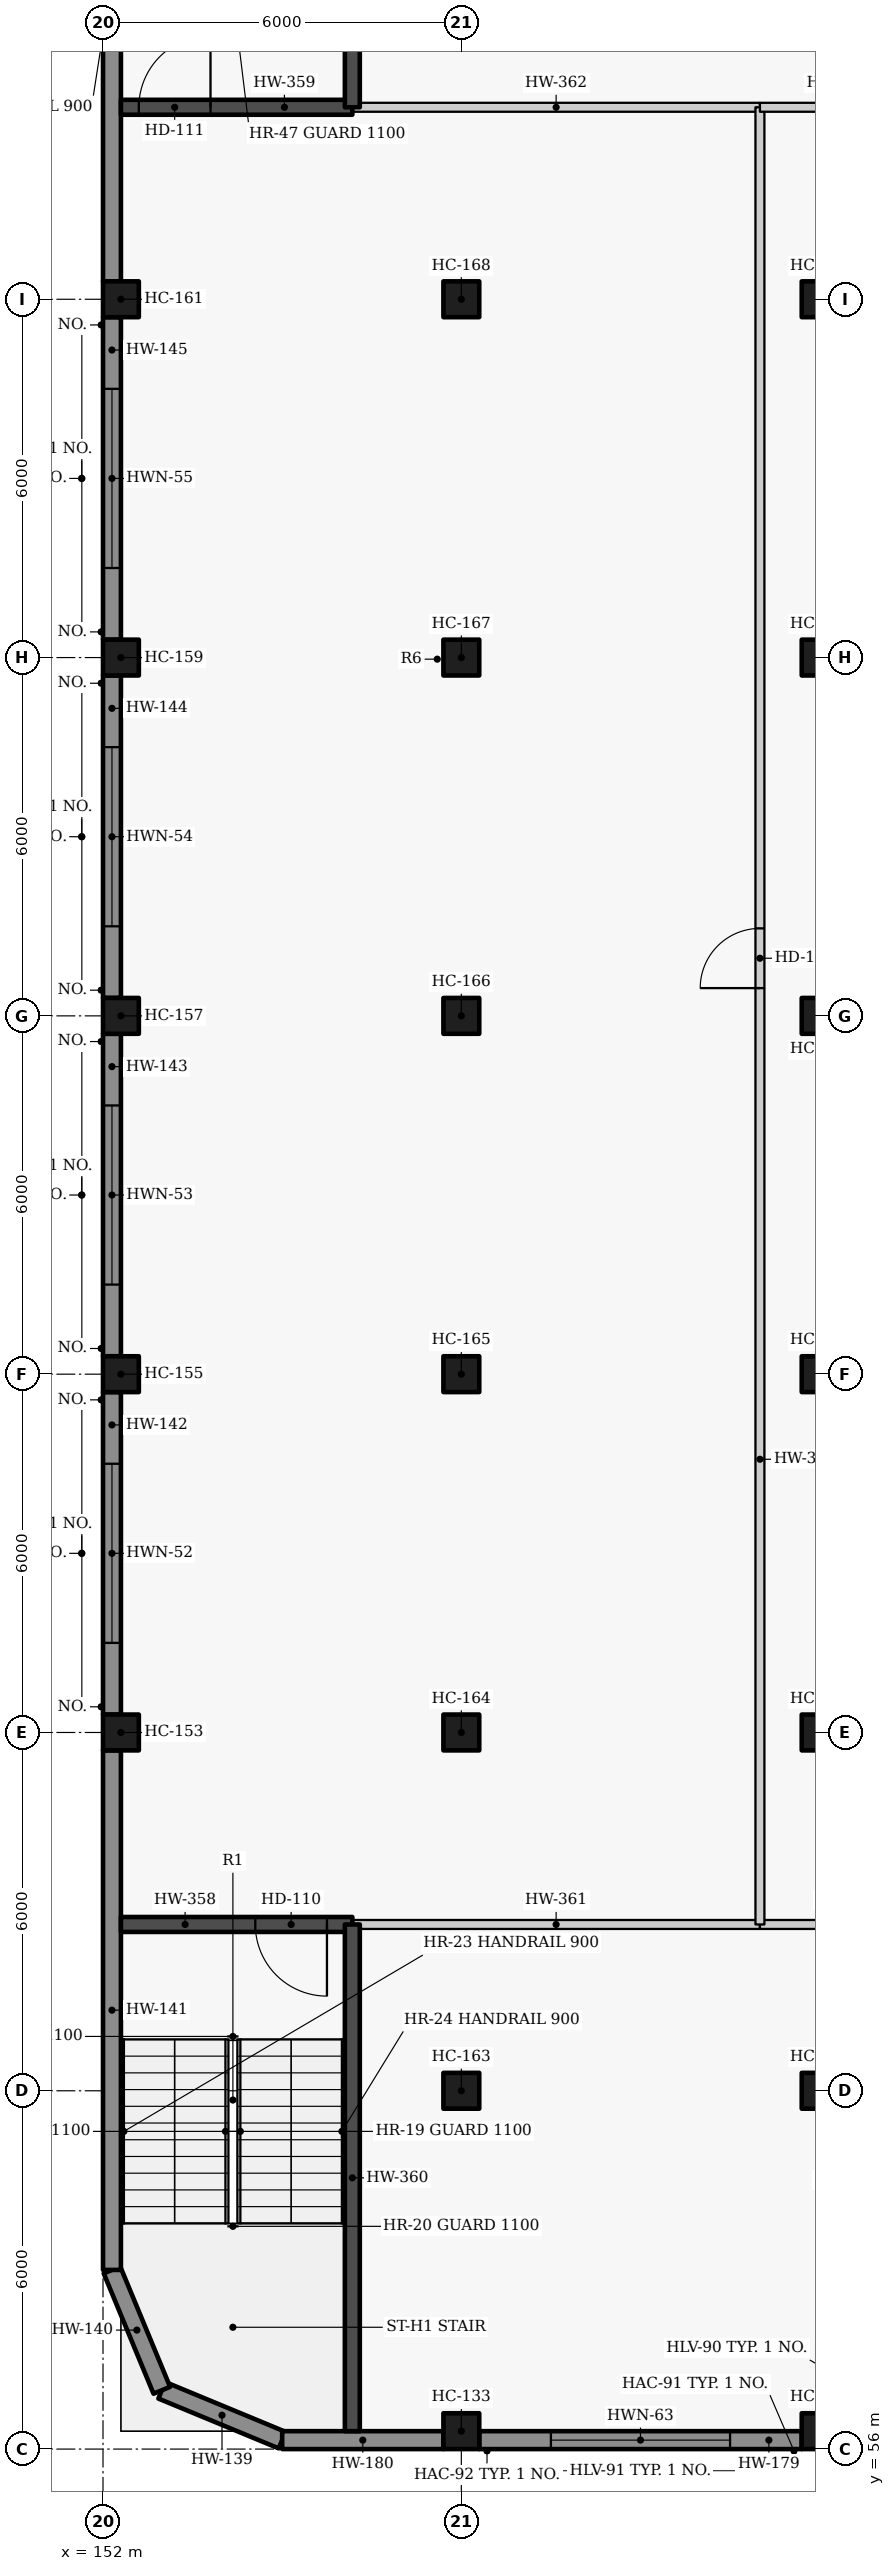
"""IFC4 building model, lengths in metres.
Left out: names, types, materials, properties, quantities, classifications, styles, units other than length and angle.
Written with IfcOpenShell. Run it as: python <this file> out.ifc"""

import sys

from ifc_helpers import new_model, si_unit, direction, frame, frame_2d, origin, origin_2d, place, context, subcontext, project, spatial, rectangle, extrude, element, fill, save


model = new_model("IFC4")
c1 = context("Model", 3, precision=1e-05, world=origin(), true_north=direction((0.0, 1.0)))
c2 = subcontext(c1, "Body", "Model", "MODEL_VIEW")
j1 = project(units=[si_unit("LENGTHUNIT", "METRE"), si_unit("PLANEANGLEUNIT", "RADIAN")], contexts=[c1])
p1 = place(None, origin())
s1 = spatial("IfcSite", under=j1, at=p1, CompositionType="ELEMENT")
p2 = place(p1, origin())
s2 = spatial("IfcBuilding", under=s1, at=p2, CompositionType="ELEMENT")
p3 = place(p2, frame((0.0, 0.0, 15.6)))
s3 = spatial("IfcBuildingStorey", under=s2, at=p3, CompositionType="ELEMENT", Elevation=15.6)
for number, where, z_axis, x_axis in (
    (1, (158.0, 56.3, 0.0), (0.0, 0.0, 1.0), (1.0, 0.0, 0.0)),
    (2, (164.0, 56.3, 0.0), (0.0, 0.0, 1.0), (1.0, 0.0, 0.0)),
    (3, (152.3, 68.0, 0.0), (0.0, 0.0, 1.0), (1.0, 0.0, 0.0)),
    (4, (152.3, 74.0, 0.0), (0.0, 0.0, 1.0), (1.0, 0.0, 0.0)),
    (5, (152.3, 80.0, 0.0), (0.0, 0.0, 1.0), (1.0, 0.0, 0.0)),
    (6, (152.3, 86.0, 0.0), (0.0, 0.0, 1.0), (1.0, 0.0, 0.0)),
    (7, (152.3, 92.0, 0.0), (0.0, 0.0, 1.0), (1.0, 0.0, 0.0)),
    (8, (158.0, 62.0, 0.0), (0.0, 0.0, 1.0), (1.0, 0.0, 0.0)),
    (9, (158.0, 68.0, 0.0), (0.0, 0.0, 1.0), (1.0, 0.0, 0.0)),
    (10, (158.0, 74.0, 0.0), (0.0, 0.0, 1.0), (1.0, 0.0, 0.0)),
    (11, (158.0, 80.0, 0.0), (0.0, 0.0, 1.0), (1.0, 0.0, 0.0)),
    (12, (158.0, 86.0, 0.0), (0.0, 0.0, 1.0), (1.0, 0.0, 0.0)),
    (13, (158.0, 92.0, 0.0), (0.0, 0.0, 1.0), (1.0, 0.0, 0.0)),
    (14, (164.0, 62.0, 0.0), (0.0, 0.0, 1.0), (1.0, 0.0, 0.0)),
    (15, (164.0, 68.0, 0.0), (0.0, 0.0, 1.0), (1.0, 0.0, 0.0)),
    (16, (164.0, 74.0, 0.0), (0.0, 0.0, 1.0), (1.0, 0.0, 0.0)),
    (17, (164.0, 80.0, 0.0), (0.0, 0.0, 1.0), (1.0, 0.0, 0.0)),
    (18, (164.0, 86.0, 0.0), (0.0, 0.0, 1.0), (1.0, 0.0, 0.0)),
    (19, (164.0, 92.0, 0.0), (0.0, 0.0, 1.0), (1.0, 0.0, 0.0)),
):
    element("IfcColumn", number, at=place(p3, frame(where, z_axis=z_axis, x_axis=x_axis)), inside=s3, PredefinedType="COLUMN", context=c2, shape_type="SweptSolid", body=[
        extrude(rectangle(XDim=0.6, YDim=0.6, at=origin_2d()), origin(), (0.0, 0.0, 1.0), 4.2),
    ])
for number, where, z_axis, x_axis in (
    (20, (155.0, 56.15, 0.0), (0.0, 0.0, 1.0), (-0.924, 0.383, 0.0)),
    (21, (152.985, 56.985, 0.0), (0.0, 0.0, 1.0), (-0.383, 0.924, 0.0)),
):
    element("IfcWall", number, at=place(p3, frame(where, z_axis=z_axis, x_axis=x_axis)), inside=s3, PredefinedType="SOLIDWALL", context=c2, shape_type="SweptSolid", body=[
        extrude(rectangle(XDim=2.181, YDim=0.3, at=frame_2d((1.091, 0.0))), origin(), (0.0, 0.0, 1.0), 4.2),
    ])
p4 = place(p3, frame((152.15, 59.0, 0.0), z_axis=(0.0, 0.0, 1.0), x_axis=(0.0, 1.0, 0.0)))
e22 = element("IfcWall", 22, at=p4, inside=s3, PredefinedType="SOLIDWALL", context=c2, shape_type="SweptSolid", body=[
    extrude(rectangle(XDim=8.7, YDim=0.3, at=frame_2d((4.35, 0.0))), origin(), (0.0, 0.0, 1.0), 4.2),
])
p5 = place(p3, frame((152.15, 68.3, 0.0), z_axis=(0.0, 0.0, 1.0), x_axis=(0.0, 1.0, 0.0)))
e23 = element("IfcWall", 23, at=p5, inside=s3, PredefinedType="SOLIDWALL", context=c2, shape_type="SweptSolid", body=[
    extrude(rectangle(XDim=5.4, YDim=0.3, at=frame_2d((2.7, 0.0))), origin(), (0.0, 0.0, 1.0), 4.2),
])
p6 = place(p5, frame((1.2, 0.0, 0.9)))
e24 = element("IfcOpeningElement", 24, at=p6, cuts=e23, PredefinedType="OPENING", context=c2, shape_type="SweptSolid", body=[
    extrude(rectangle(XDim=3.0, YDim=1.8, at=frame_2d((1.5, 0.9))), frame((0.0, 0.16, 0.0), z_axis=(0.0, -1.0, 0.0), x_axis=(1.0, 0.0, 0.0)), (0.0, 0.0, 1.0), 0.32),
])
p7 = place(p3, frame((152.15, 74.3, 0.0), z_axis=(0.0, 0.0, 1.0), x_axis=(0.0, 1.0, 0.0)))
e25 = element("IfcWall", 25, at=p7, inside=s3, PredefinedType="SOLIDWALL", context=c2, shape_type="SweptSolid", body=[
    extrude(rectangle(XDim=5.4, YDim=0.3, at=frame_2d((2.7, 0.0))), origin(), (0.0, 0.0, 1.0), 4.2),
])
p8 = place(p7, frame((1.2, 0.0, 0.9)))
e26 = element("IfcOpeningElement", 26, at=p8, cuts=e25, PredefinedType="OPENING", context=c2, shape_type="SweptSolid", body=[
    extrude(rectangle(XDim=3.0, YDim=1.8, at=frame_2d((1.5, 0.9))), frame((0.0, 0.16, 0.0), z_axis=(0.0, -1.0, 0.0), x_axis=(1.0, 0.0, 0.0)), (0.0, 0.0, 1.0), 0.32),
])
p9 = place(p3, frame((152.15, 80.3, 0.0), z_axis=(0.0, 0.0, 1.0), x_axis=(0.0, 1.0, 0.0)))
e27 = element("IfcWall", 27, at=p9, inside=s3, PredefinedType="SOLIDWALL", context=c2, shape_type="SweptSolid", body=[
    extrude(rectangle(XDim=5.4, YDim=0.3, at=frame_2d((2.7, 0.0))), origin(), (0.0, 0.0, 1.0), 4.2),
])
p10 = place(p9, frame((1.2, 0.0, 0.9)))
e28 = element("IfcOpeningElement", 28, at=p10, cuts=e27, PredefinedType="OPENING", context=c2, shape_type="SweptSolid", body=[
    extrude(rectangle(XDim=3.0, YDim=1.8, at=frame_2d((1.5, 0.9))), frame((0.0, 0.16, 0.0), z_axis=(0.0, -1.0, 0.0), x_axis=(1.0, 0.0, 0.0)), (0.0, 0.0, 1.0), 0.32),
])
p11 = place(p3, frame((152.15, 86.3, 0.0), z_axis=(0.0, 0.0, 1.0), x_axis=(0.0, 1.0, 0.0)))
e29 = element("IfcWall", 29, at=p11, inside=s3, PredefinedType="SOLIDWALL", context=c2, shape_type="SweptSolid", body=[
    extrude(rectangle(XDim=5.4, YDim=0.3, at=frame_2d((2.7, 0.0))), origin(), (0.0, 0.0, 1.0), 4.2),
])
p12 = place(p11, frame((1.2, 0.0, 0.9)))
e30 = element("IfcOpeningElement", 30, at=p12, cuts=e29, PredefinedType="OPENING", context=c2, shape_type="SweptSolid", body=[
    extrude(rectangle(XDim=3.0, YDim=1.8, at=frame_2d((1.5, 0.9))), frame((0.0, 0.16, 0.0), z_axis=(0.0, -1.0, 0.0), x_axis=(1.0, 0.0, 0.0)), (0.0, 0.0, 1.0), 0.32),
])
p13 = place(p3, frame((152.15, 92.3, 0.0), z_axis=(0.0, 0.0, 1.0), x_axis=(0.0, 1.0, 0.0)))
e31 = element("IfcWall", 31, at=p13, inside=s3, PredefinedType="SOLIDWALL", context=c2, shape_type="SweptSolid", body=[
    extrude(rectangle(XDim=8.7, YDim=0.3, at=frame_2d((4.35, 0.0))), origin(), (0.0, 0.0, 1.0), 4.2),
])
p14 = place(p3, frame((163.7, 56.15, 0.0), z_axis=(0.0, 0.0, 1.0), x_axis=(-1.0, 0.0, 0.0)))
e32 = element("IfcWall", 32, at=p14, inside=s3, PredefinedType="SOLIDWALL", context=c2, shape_type="SweptSolid", body=[
    extrude(rectangle(XDim=5.4, YDim=0.3, at=frame_2d((2.7, 0.0))), origin(), (0.0, 0.0, 1.0), 4.2),
])
p15 = place(p14, frame((1.2, 0.0, 0.9)))
e33 = element("IfcOpeningElement", 33, at=p15, cuts=e32, PredefinedType="OPENING", context=c2, shape_type="SweptSolid", body=[
    extrude(rectangle(XDim=3.0, YDim=1.8, at=frame_2d((1.5, 0.9))), frame((0.0, 0.16, 0.0), z_axis=(0.0, -1.0, 0.0), x_axis=(1.0, 0.0, 0.0)), (0.0, 0.0, 1.0), 0.32),
])
p16 = place(p3, frame((157.7, 56.15, 0.0), z_axis=(0.0, 0.0, 1.0), x_axis=(-1.0, 0.0, 0.0)))
e34 = element("IfcWall", 34, at=p16, inside=s3, PredefinedType="SOLIDWALL", context=c2, shape_type="SweptSolid", body=[
    extrude(rectangle(XDim=2.7, YDim=0.3, at=frame_2d((1.35, 0.0))), origin(), (0.0, 0.0, 1.0), 4.2),
])
p17 = place(p3, frame((156.175, 64.785, 0.0), z_axis=(0.0, 0.0, 1.0), x_axis=(-1.0, 0.0, 0.0)))
e35 = element("IfcWall", 35, at=p17, inside=s3, PredefinedType="SOLIDWALL", context=c2, shape_type="SweptSolid", body=[
    extrude(rectangle(XDim=3.875, YDim=0.25, at=frame_2d((1.938, 0.0))), origin(), (0.0, 0.0, 1.0), 4.2),
])
p18 = place(p17, frame((0.425, 0.0, 0.0)))
e36 = element("IfcOpeningElement", 36, at=p18, cuts=e35, PredefinedType="OPENING", context=c2, shape_type="SweptSolid", body=[
    extrude(rectangle(XDim=1.2, YDim=2.1, at=frame_2d((0.6, 1.05))), frame((0.0, 0.135, 0.0), z_axis=(0.0, -1.0, 0.0), x_axis=(1.0, 0.0, 0.0)), (0.0, 0.0, 1.0), 0.27),
])
p19 = place(p3, frame((152.3, 95.215, 0.0), z_axis=(0.0, 0.0, 1.0), x_axis=(1.0, 0.0, 0.0)))
e37 = element("IfcWall", 37, at=p19, inside=s3, PredefinedType="SOLIDWALL", context=c2, shape_type="SweptSolid", body=[
    extrude(rectangle(XDim=3.875, YDim=0.25, at=frame_2d((1.938, 0.0))), origin(), (0.0, 0.0, 1.0), 4.2),
])
p20 = place(p19, frame((0.3, 0.0, 0.0)))
e38 = element("IfcOpeningElement", 38, at=p20, cuts=e37, PredefinedType="OPENING", context=c2, shape_type="SweptSolid", body=[
    extrude(rectangle(XDim=1.2, YDim=2.1, at=frame_2d((0.6, 1.05))), frame((0.0, 0.135, 0.0), z_axis=(0.0, -1.0, 0.0), x_axis=(1.0, 0.0, 0.0)), (0.0, 0.0, 1.0), 0.27),
])
p21 = place(p3, frame((156.175, 64.785, 0.0), z_axis=(0.0, 0.0, 1.0), x_axis=(0.0, -1.0, 0.0)))
e39 = element("IfcWall", 39, at=p21, inside=s3, PredefinedType="SOLIDWALL", context=c2, shape_type="SweptSolid", body=[
    extrude(rectangle(XDim=8.485, YDim=0.25, at=frame_2d((4.242, 0.0))), origin(), (0.0, 0.0, 1.0), 4.2),
])
for number, where, z_axis, x_axis in (
    (40, (163.0, 64.785, 0.0), (0.0, 0.0, 1.0), (-1.0, 0.0, 0.0)),
    (41, (163.0, 95.215, 0.0), (0.0, 0.0, 1.0), (-1.0, 0.0, 0.0)),
):
    element("IfcWall", number, at=place(p3, frame(where, z_axis=z_axis, x_axis=x_axis)), inside=s3, PredefinedType="PARTITIONING", context=c2, shape_type="SweptSolid", body=[
        extrude(rectangle(XDim=6.825, YDim=0.15, at=frame_2d((3.413, 0.0))), origin(), (0.0, 0.0, 1.0), 3.85),
    ])
p22 = place(p3, frame((156.175, 97.715, 0.0), z_axis=(0.0, 0.0, 1.0), x_axis=(0.0, -1.0, 0.0)))
e42 = element("IfcWall", 42, at=p22, inside=s3, PredefinedType="SOLIDWALL", context=c2, shape_type="SweptSolid", body=[
    extrude(rectangle(XDim=2.5, YDim=0.25, at=frame_2d((1.25, 0.0))), origin(), (0.0, 0.0, 1.0), 4.2),
])
p23 = place(p3, frame((170.0, 64.785, 0.0), z_axis=(0.0, 0.0, 1.0), x_axis=(-1.0, 0.0, 0.0)))
e43 = element("IfcWall", 43, at=p23, inside=s3, PredefinedType="PARTITIONING", context=c2, shape_type="SweptSolid", body=[
    extrude(rectangle(XDim=7.0, YDim=0.15, at=frame_2d((3.5, 0.0))), origin(), (0.0, 0.0, 1.0), 3.85),
])
p24 = place(p23, frame((3.0, 0.0, 0.0)))
e44 = element("IfcOpeningElement", 44, at=p24, cuts=e43, PredefinedType="OPENING", context=c2, shape_type="SweptSolid", body=[
    extrude(rectangle(XDim=1.0, YDim=2.1, at=frame_2d((0.5, 1.05))), frame((0.0, 0.085, 0.0), z_axis=(0.0, -1.0, 0.0), x_axis=(1.0, 0.0, 0.0)), (0.0, 0.0, 1.0), 0.17),
])
p25 = place(p3, frame((163.0, 64.785, 0.0), z_axis=(0.0, 0.0, 1.0), x_axis=(0.0, 1.0, 0.0)))
e45 = element("IfcWall", 45, at=p25, inside=s3, PredefinedType="PARTITIONING", context=c2, shape_type="SweptSolid", body=[
    extrude(rectangle(XDim=30.43, YDim=0.15, at=frame_2d((15.215, 0.0))), origin(), (0.0, 0.0, 1.0), 3.85),
])
p26 = place(p25, frame((15.68, 0.0, 0.0)))
e46 = element("IfcOpeningElement", 46, at=p26, cuts=e45, PredefinedType="OPENING", context=c2, shape_type="SweptSolid", body=[
    extrude(rectangle(XDim=1.0, YDim=2.1, at=frame_2d((0.5, 1.05))), frame((0.0, 0.085, 0.0), z_axis=(0.0, -1.0, 0.0), x_axis=(1.0, 0.0, 0.0)), (0.0, 0.0, 1.0), 0.17),
])
p27 = place(p3, frame((163.0, 95.215, 0.0), z_axis=(0.0, 0.0, 1.0), x_axis=(1.0, 0.0, 0.0)))
e47 = element("IfcWall", 47, at=p27, inside=s3, PredefinedType="PARTITIONING", context=c2, shape_type="SweptSolid", body=[
    extrude(rectangle(XDim=7.0, YDim=0.15, at=frame_2d((3.5, 0.0))), origin(), (0.0, 0.0, 1.0), 3.85),
])
p28 = place(p27, frame((2.7, 0.0, 0.0)))
e48 = element("IfcOpeningElement", 48, at=p28, cuts=e47, PredefinedType="OPENING", context=c2, shape_type="SweptSolid", body=[
    extrude(rectangle(XDim=1.6, YDim=2.1, at=frame_2d((0.8, 1.05))), frame((0.0, 0.085, 0.0), z_axis=(0.0, -1.0, 0.0), x_axis=(1.0, 0.0, 0.0)), (0.0, 0.0, 1.0), 0.17),
])
p29 = place(p6, origin())
e49 = element("IfcWindow", 49, at=p29, inside=s3, PartitioningType="SINGLE_PANEL", PredefinedType="WINDOW", context=c2, shape_type="SweptSolid", body=[
    extrude(rectangle(XDim=3.0, YDim=1.8, at=frame_2d((1.5, 0.9))), frame((0.0, 0.03, 0.0), z_axis=(0.0, -1.0, 0.0), x_axis=(1.0, 0.0, 0.0)), (0.0, 0.0, 1.0), 0.06),
])
fill(e24, e49)
p30 = place(p8, origin())
e50 = element("IfcWindow", 50, at=p30, inside=s3, PartitioningType="SINGLE_PANEL", PredefinedType="WINDOW", context=c2, shape_type="SweptSolid", body=[
    extrude(rectangle(XDim=3.0, YDim=1.8, at=frame_2d((1.5, 0.9))), frame((0.0, 0.03, 0.0), z_axis=(0.0, -1.0, 0.0), x_axis=(1.0, 0.0, 0.0)), (0.0, 0.0, 1.0), 0.06),
])
fill(e26, e50)
p31 = place(p10, origin())
e51 = element("IfcWindow", 51, at=p31, inside=s3, PartitioningType="SINGLE_PANEL", PredefinedType="WINDOW", context=c2, shape_type="SweptSolid", body=[
    extrude(rectangle(XDim=3.0, YDim=1.8, at=frame_2d((1.5, 0.9))), frame((0.0, 0.03, 0.0), z_axis=(0.0, -1.0, 0.0), x_axis=(1.0, 0.0, 0.0)), (0.0, 0.0, 1.0), 0.06),
])
fill(e28, e51)
p32 = place(p12, origin())
e52 = element("IfcWindow", 52, at=p32, inside=s3, PartitioningType="SINGLE_PANEL", PredefinedType="WINDOW", context=c2, shape_type="SweptSolid", body=[
    extrude(rectangle(XDim=3.0, YDim=1.8, at=frame_2d((1.5, 0.9))), frame((0.0, 0.03, 0.0), z_axis=(0.0, -1.0, 0.0), x_axis=(1.0, 0.0, 0.0)), (0.0, 0.0, 1.0), 0.06),
])
fill(e30, e52)
p33 = place(p15, origin())
e53 = element("IfcWindow", 53, at=p33, inside=s3, PartitioningType="SINGLE_PANEL", PredefinedType="WINDOW", context=c2, shape_type="SweptSolid", body=[
    extrude(rectangle(XDim=3.0, YDim=1.8, at=frame_2d((1.5, 0.9))), frame((0.0, 0.03, 0.0), z_axis=(0.0, -1.0, 0.0), x_axis=(1.0, 0.0, 0.0)), (0.0, 0.0, 1.0), 0.06),
])
fill(e33, e53)
p34 = place(p18, origin())
e54 = element("IfcDoor", 54, at=p34, inside=s3, OperationType="SINGLE_SWING_LEFT", PredefinedType="DOOR", context=c2, shape_type="SweptSolid", body=[
    extrude(rectangle(XDim=1.2, YDim=2.1, at=frame_2d((0.6, 1.05))), frame((0.0, 0.025, 0.0), z_axis=(0.0, -1.0, 0.0), x_axis=(1.0, 0.0, 0.0)), (0.0, 0.0, 1.0), 0.05),
])
fill(e36, e54)
p35 = place(p20, origin())
e55 = element("IfcDoor", 55, at=p35, inside=s3, OperationType="SINGLE_SWING_RIGHT", PredefinedType="DOOR", context=c2, shape_type="SweptSolid", body=[
    extrude(rectangle(XDim=1.2, YDim=2.1, at=frame_2d((0.6, 1.05))), frame((0.0, 0.025, 0.0), z_axis=(0.0, -1.0, 0.0), x_axis=(1.0, 0.0, 0.0)), (0.0, 0.0, 1.0), 0.05),
])
fill(e38, e55)
p36 = place(p26, origin())
e56 = element("IfcDoor", 56, at=p36, inside=s3, OperationType="SINGLE_SWING_LEFT", PredefinedType="DOOR", context=c2, shape_type="SweptSolid", body=[
    extrude(rectangle(XDim=1.0, YDim=2.1, at=frame_2d((0.5, 1.05))), frame((0.0, 0.025, 0.0), z_axis=(0.0, -1.0, 0.0), x_axis=(1.0, 0.0, 0.0)), (0.0, 0.0, 1.0), 0.05),
])
fill(e46, e56)
save(model, sys.argv[1])
